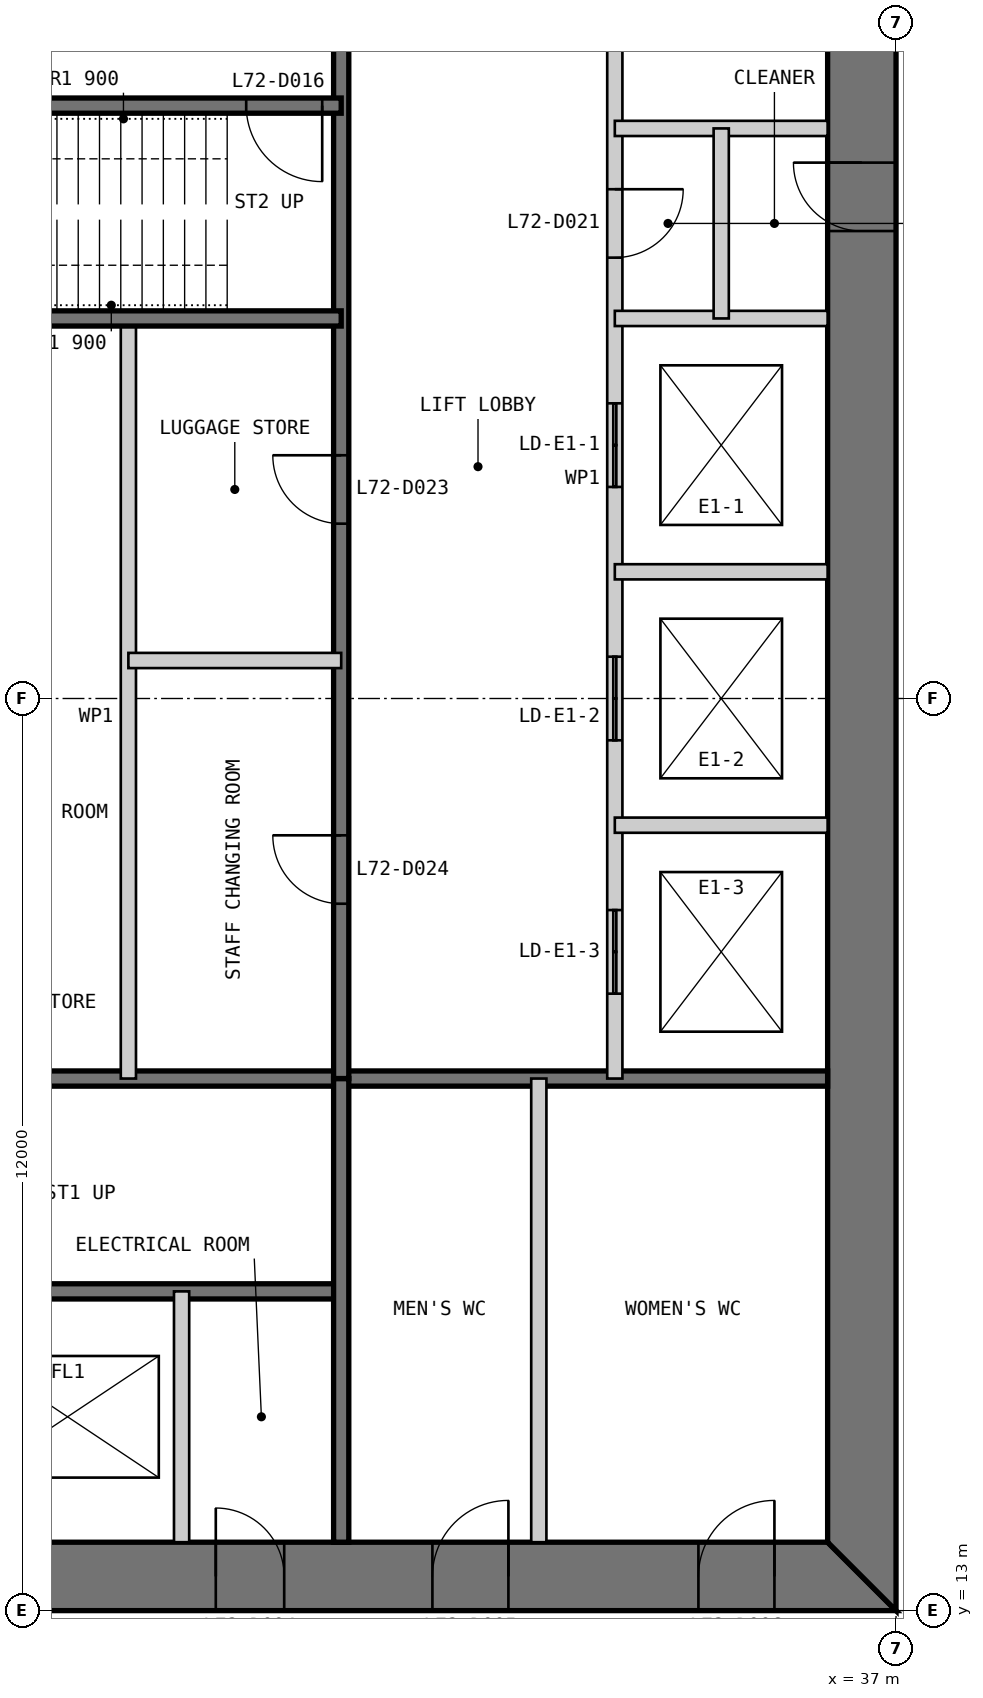
"""IFC4 building model, lengths in metres.
Left out: names, types, materials, properties, quantities, classifications, styles, units other than length and angle.
Written with IfcOpenShell. Run it as: python <this file> out.ifc"""

import sys

from ifc_helpers import new_model, si_unit, direction, frame, frame_2d, origin, place, context, subcontext, project, spatial, polyline, rectangle, outline, extrude, element, fill, save


model = new_model("IFC4")
c1 = context("Model", 3, precision=1e-05, world=origin(), true_north=direction((0.0, 1.0)))
c2 = subcontext(c1, "Body", "Model", "MODEL_VIEW")
j1 = project(units=[si_unit("LENGTHUNIT", "METRE"), si_unit("PLANEANGLEUNIT", "RADIAN")], contexts=[c1])
p1 = place(None, origin())
s1 = spatial("IfcSite", under=j1, at=p1, CompositionType="ELEMENT")
p2 = place(p1, origin())
s2 = spatial("IfcBuilding", under=s1, at=p2, CompositionType="ELEMENT")
p3 = place(p2, frame((0.0, 0.0, 296.8)))
s3 = spatial("IfcBuildingStorey", under=s2, at=p3, CompositionType="ELEMENT", Elevation=296.8)
p4 = place(p3, frame((13.0, 13.45, 0.0), z_axis=(0.0, 0.0, 1.0), x_axis=(1.0, 0.0, 0.0)))
e1 = element("IfcWall", 1, at=p4, inside=s3, PredefinedType="SHEAR", context=c2, shape_type="SweptSolid", body=[
    extrude(outline(polyline([(0.0, -0.45), (24.0, -0.45), (23.1, 0.45), (0.9, 0.45), (0.0, -0.45)])), origin(), (0.0, 0.0, 1.0), 5.0),
])
p5 = place(p4, frame((4.9, 0.0, 0.0)))
e2 = element("IfcOpeningElement", 2, at=p5, cuts=e1, PredefinedType="OPENING", context=c2, shape_type="SweptSolid", body=[
    extrude(rectangle(XDim=1.0, YDim=2.2, at=frame_2d((0.5, 1.1))), frame((0.0, 0.46, 0.0), z_axis=(0.0, -1.0, 0.0), x_axis=(1.0, 0.0, 0.0)), (0.0, 0.0, 1.0), 0.92),
])
p6 = place(p4, frame((8.9, 0.0, 0.0)))
e3 = element("IfcOpeningElement", 3, at=p6, cuts=e1, PredefinedType="OPENING", context=c2, shape_type="SweptSolid", body=[
    extrude(rectangle(XDim=1.1, YDim=2.2, at=frame_2d((0.55, 1.1))), frame((0.0, 0.46, 0.0), z_axis=(0.0, -1.0, 0.0), x_axis=(1.0, 0.0, 0.0)), (0.0, 0.0, 1.0), 0.92),
])
p7 = place(p4, frame((15.05, 0.0, 0.0)))
e4 = element("IfcOpeningElement", 4, at=p7, cuts=e1, PredefinedType="OPENING", context=c2, shape_type="SweptSolid", body=[
    extrude(rectangle(XDim=0.9, YDim=2.2, at=frame_2d((0.45, 1.1))), frame((0.0, 0.46, 0.0), z_axis=(0.0, -1.0, 0.0), x_axis=(1.0, 0.0, 0.0)), (0.0, 0.0, 1.0), 0.92),
])
p8 = place(p4, frame((17.9, 0.0, 0.0)))
e5 = element("IfcOpeningElement", 5, at=p8, cuts=e1, PredefinedType="OPENING", context=c2, shape_type="SweptSolid", body=[
    extrude(rectangle(XDim=1.0, YDim=2.2, at=frame_2d((0.5, 1.1))), frame((0.0, 0.46, 0.0), z_axis=(0.0, -1.0, 0.0), x_axis=(1.0, 0.0, 0.0)), (0.0, 0.0, 1.0), 0.92),
])
p9 = place(p4, frame((21.4, 0.0, 0.0)))
e6 = element("IfcOpeningElement", 6, at=p9, cuts=e1, PredefinedType="OPENING", context=c2, shape_type="SweptSolid", body=[
    extrude(rectangle(XDim=1.0, YDim=2.2, at=frame_2d((0.5, 1.1))), frame((0.0, 0.46, 0.0), z_axis=(0.0, -1.0, 0.0), x_axis=(1.0, 0.0, 0.0)), (0.0, 0.0, 1.0), 0.92),
])
p10 = place(p3, frame((36.55, 13.9, 0.0), z_axis=(0.0, 0.0, 1.0), x_axis=(0.0, 1.0, 0.0)))
e7 = element("IfcWall", 7, at=p10, inside=s3, PredefinedType="SHEAR", context=c2, shape_type="SweptSolid", body=[
    extrude(outline(polyline([(-0.9, -0.45), (23.1, -0.45), (22.2, 0.45), (0.0, 0.45), (-0.9, -0.45)])), origin(), (0.0, 0.0, 1.0), 5.0),
])
p11 = place(p10, frame((20.2, 0.0, 0.0)))
e8 = element("IfcOpeningElement", 8, at=p11, cuts=e7, PredefinedType="OPENING", context=c2, shape_type="SweptSolid", body=[
    extrude(rectangle(XDim=1.0, YDim=2.2, at=frame_2d((0.5, 1.1))), frame((0.0, 0.46, 0.0), z_axis=(0.0, -1.0, 0.0), x_axis=(1.0, 0.0, 0.0)), (0.0, 0.0, 1.0), 0.92),
])
p12 = place(p10, frame((17.25, 0.0, 0.0)))
e9 = element("IfcOpeningElement", 9, at=p12, cuts=e7, PredefinedType="OPENING", context=c2, shape_type="SweptSolid", body=[
    extrude(rectangle(XDim=0.9, YDim=2.2, at=frame_2d((0.45, 1.1))), frame((0.0, 0.46, 0.0), z_axis=(0.0, -1.0, 0.0), x_axis=(1.0, 0.0, 0.0)), (0.0, 0.0, 1.0), 0.92),
])
p13 = place(p3, frame((20.3, 17.2, 0.0), z_axis=(0.0, 0.0, 1.0), x_axis=(1.0, 0.0, 0.0)))
e10 = element("IfcWall", 10, at=p13, inside=s3, PredefinedType="SOLIDWALL", context=c2, shape_type="SweptSolid", body=[
    extrude(rectangle(XDim=9.4, YDim=0.2, at=frame_2d((4.7, 0.0))), origin(), (0.0, 0.0, 1.0), 4.8),
])
p14 = place(p13, frame((0.25, 0.0, 0.0)))
e11 = element("IfcOpeningElement", 11, at=p14, cuts=e10, PredefinedType="OPENING", context=c2, shape_type="SweptSolid", body=[
    extrude(rectangle(XDim=1.0, YDim=2.2, at=frame_2d((0.5, 1.1))), frame((0.0, 0.11, 0.0), z_axis=(0.0, -1.0, 0.0), x_axis=(1.0, 0.0, 0.0)), (0.0, 0.0, 1.0), 0.22),
])
p15 = place(p3, frame((20.3, 20.0, 0.0), z_axis=(0.0, 0.0, 1.0), x_axis=(1.0, 0.0, 0.0)))
e12 = element("IfcWall", 12, at=p15, inside=s3, PredefinedType="SOLIDWALL", context=c2, shape_type="SweptSolid", body=[
    extrude(rectangle(XDim=15.8, YDim=0.2, at=frame_2d((7.9, 0.0))), origin(), (0.0, 0.0, 1.0), 4.8),
])
p16 = place(p3, frame((27.6, 13.9, 0.0), z_axis=(0.0, 0.0, 1.0), x_axis=(0.0, 1.0, 0.0)))
e13 = element("IfcWall", 13, at=p16, inside=s3, PredefinedType="PARTITIONING", context=c2, shape_type="SweptSolid", body=[
    extrude(rectangle(XDim=3.3, YDim=0.2, at=frame_2d((1.65, 0.0))), origin(), (0.0, 0.0, 1.0), 4.8),
])
p17 = place(p3, frame((29.7, 13.9, 0.0), z_axis=(0.0, 0.0, 1.0), x_axis=(0.0, 1.0, 0.0)))
e14 = element("IfcWall", 14, at=p17, inside=s3, PredefinedType="SOLIDWALL", context=c2, shape_type="SweptSolid", body=[
    extrude(rectangle(XDim=6.1, YDim=0.2, at=frame_2d((3.05, 0.0))), origin(), (0.0, 0.0, 1.0), 4.8),
])
p18 = place(p3, frame((32.3, 13.9, 0.0), z_axis=(0.0, 0.0, 1.0), x_axis=(0.0, 1.0, 0.0)))
e15 = element("IfcWall", 15, at=p18, inside=s3, PredefinedType="PARTITIONING", context=c2, shape_type="SweptSolid", body=[
    extrude(rectangle(XDim=6.1, YDim=0.2, at=frame_2d((3.05, 0.0))), origin(), (0.0, 0.0, 1.0), 4.8),
])
p19 = place(p3, frame((33.3, 36.1, 0.0), z_axis=(0.0, 0.0, 1.0), x_axis=(0.0, -1.0, 0.0)))
e16 = element("IfcWall", 16, at=p19, inside=s3, PredefinedType="PARTITIONING", context=c2, shape_type="SweptSolid", body=[
    extrude(rectangle(XDim=16.1, YDim=0.2, at=frame_2d((8.05, 0.0))), origin(), (0.0, 0.0, 1.0), 4.8),
])
p20 = place(p19, frame((4.4, 0.0, 0.0)))
e17 = element("IfcOpeningElement", 17, at=p20, cuts=e16, PredefinedType="OPENING", context=c2, shape_type="SweptSolid", body=[
    extrude(rectangle(XDim=0.9, YDim=2.2, at=frame_2d((0.45, 1.1))), frame((0.0, 0.11, 0.0), z_axis=(0.0, -1.0, 0.0), x_axis=(1.0, 0.0, 0.0)), (0.0, 0.0, 1.0), 0.22),
])
p21 = place(p19, frame((7.217, 0.0, 0.0)))
e18 = element("IfcOpeningElement", 18, at=p21, cuts=e16, PredefinedType="OPENING", context=c2, shape_type="SweptSolid", body=[
    extrude(rectangle(XDim=1.1, YDim=2.2, at=frame_2d((0.55, 1.1))), frame((0.0, 0.11, 0.0), z_axis=(0.0, -1.0, 0.0), x_axis=(1.0, 0.0, 0.0)), (0.0, 0.0, 1.0), 0.22),
])
p22 = place(p19, frame((10.55, 0.0, 0.0)))
e19 = element("IfcOpeningElement", 19, at=p22, cuts=e16, PredefinedType="OPENING", context=c2, shape_type="SweptSolid", body=[
    extrude(rectangle(XDim=1.1, YDim=2.2, at=frame_2d((0.55, 1.1))), frame((0.0, 0.11, 0.0), z_axis=(0.0, -1.0, 0.0), x_axis=(1.0, 0.0, 0.0)), (0.0, 0.0, 1.0), 0.22),
])
p23 = place(p19, frame((13.883, 0.0, 0.0)))
e20 = element("IfcOpeningElement", 20, at=p23, cuts=e16, PredefinedType="OPENING", context=c2, shape_type="SweptSolid", body=[
    extrude(rectangle(XDim=1.1, YDim=2.2, at=frame_2d((0.55, 1.1))), frame((0.0, 0.11, 0.0), z_axis=(0.0, -1.0, 0.0), x_axis=(1.0, 0.0, 0.0)), (0.0, 0.0, 1.0), 0.22),
])
p24 = place(p3, frame((29.7, 36.1, 0.0), z_axis=(0.0, 0.0, 1.0), x_axis=(0.0, -1.0, 0.0)))
e21 = element("IfcWall", 21, at=p24, inside=s3, PredefinedType="SOLIDWALL", context=c2, shape_type="SweptSolid", body=[
    extrude(rectangle(XDim=16.1, YDim=0.2, at=frame_2d((8.05, 0.0))), origin(), (0.0, 0.0, 1.0), 4.8),
])
p25 = place(p24, frame((7.9, 0.0, 0.0)))
e22 = element("IfcOpeningElement", 22, at=p25, cuts=e21, PredefinedType="OPENING", context=c2, shape_type="SweptSolid", body=[
    extrude(rectangle(XDim=0.9, YDim=2.2, at=frame_2d((0.45, 1.1))), frame((0.0, 0.11, 0.0), z_axis=(0.0, -1.0, 0.0), x_axis=(1.0, 0.0, 0.0)), (0.0, 0.0, 1.0), 0.22),
])
p26 = place(p24, frame((12.9, 0.0, 0.0)))
e23 = element("IfcOpeningElement", 23, at=p26, cuts=e21, PredefinedType="OPENING", context=c2, shape_type="SweptSolid", body=[
    extrude(rectangle(XDim=0.9, YDim=2.2, at=frame_2d((0.45, 1.1))), frame((0.0, 0.11, 0.0), z_axis=(0.0, -1.0, 0.0), x_axis=(1.0, 0.0, 0.0)), (0.0, 0.0, 1.0), 0.22),
])
for number, where, z_axis, x_axis in (
    (24, (36.1, 30.0, 0.0), (0.0, 0.0, 1.0), (-1.0, 0.0, 0.0)),
    (25, (36.1, 26.667, 0.0), (0.0, 0.0, 1.0), (-1.0, 0.0, 0.0)),
    (26, (36.1, 23.333, 0.0), (0.0, 0.0, 1.0), (-1.0, 0.0, 0.0)),
):
    element("IfcWall", number, at=place(p3, frame(where, z_axis=z_axis, x_axis=x_axis)), inside=s3, PredefinedType="PARTITIONING", context=c2, shape_type="SweptSolid", body=[
        extrude(rectangle(XDim=2.8, YDim=0.2, at=frame_2d((1.4, 0.0))), origin(), (0.0, 0.0, 1.0), 4.8),
    ])
p27 = place(p3, frame((26.9, 30.0, 0.0), z_axis=(0.0, 0.0, 1.0), x_axis=(0.0, -1.0, 0.0)))
e27 = element("IfcWall", 27, at=p27, inside=s3, PredefinedType="PARTITIONING", context=c2, shape_type="SweptSolid", body=[
    extrude(rectangle(XDim=10.0, YDim=0.2, at=frame_2d((5.0, 0.0))), origin(), (0.0, 0.0, 1.0), 4.8),
])
p28 = place(p3, frame((29.7, 32.8, 0.0), z_axis=(0.0, 0.0, 1.0), x_axis=(-1.0, 0.0, 0.0)))
e28 = element("IfcWall", 28, at=p28, inside=s3, PredefinedType="SOLIDWALL", context=c2, shape_type="SweptSolid", body=[
    extrude(rectangle(XDim=9.4, YDim=0.2, at=frame_2d((4.7, 0.0))), origin(), (0.0, 0.0, 1.0), 4.8),
])
p29 = place(p28, frame((0.25, 0.0, 0.0)))
e29 = element("IfcOpeningElement", 29, at=p29, cuts=e28, PredefinedType="OPENING", context=c2, shape_type="SweptSolid", body=[
    extrude(rectangle(XDim=1.0, YDim=2.2, at=frame_2d((0.5, 1.1))), frame((0.0, 0.11, 0.0), z_axis=(0.0, -1.0, 0.0), x_axis=(1.0, 0.0, 0.0)), (0.0, 0.0, 1.0), 0.22),
])
p30 = place(p3, frame((29.7, 30.0, 0.0), z_axis=(0.0, 0.0, 1.0), x_axis=(-1.0, 0.0, 0.0)))
e30 = element("IfcWall", 30, at=p30, inside=s3, PredefinedType="SOLIDWALL", context=c2, shape_type="SweptSolid", body=[
    extrude(rectangle(XDim=15.8, YDim=0.2, at=frame_2d((7.9, 0.0))), origin(), (0.0, 0.0, 1.0), 4.8),
])
p31 = place(p3, frame((36.1, 32.5, 0.0), z_axis=(0.0, 0.0, 1.0), x_axis=(-1.0, 0.0, 0.0)))
e31 = element("IfcWall", 31, at=p31, inside=s3, PredefinedType="PARTITIONING", context=c2, shape_type="SweptSolid", body=[
    extrude(rectangle(XDim=2.8, YDim=0.2, at=frame_2d((1.4, 0.0))), origin(), (0.0, 0.0, 1.0), 4.8),
])
p32 = place(p3, frame((34.7, 32.5, 0.0), z_axis=(0.0, 0.0, 1.0), x_axis=(0.0, -1.0, 0.0)))
e32 = element("IfcWall", 32, at=p32, inside=s3, PredefinedType="PARTITIONING", context=c2, shape_type="SweptSolid", body=[
    extrude(rectangle(XDim=2.5, YDim=0.2, at=frame_2d((1.25, 0.0))), origin(), (0.0, 0.0, 1.0), 4.8),
])
p33 = place(p3, frame((29.7, 25.5, 0.0), z_axis=(0.0, 0.0, 1.0), x_axis=(-1.0, 0.0, 0.0)))
e33 = element("IfcWall", 33, at=p33, inside=s3, PredefinedType="PARTITIONING", context=c2, shape_type="SweptSolid", body=[
    extrude(rectangle(XDim=2.8, YDim=0.2, at=frame_2d((1.4, 0.0))), origin(), (0.0, 0.0, 1.0), 4.8),
])
p34 = place(p7, origin())
e34 = element("IfcDoor", 34, at=p34, inside=s3, OperationType="SINGLE_SWING_LEFT", PredefinedType="DOOR", context=c2, shape_type="SweptSolid", body=[
    extrude(rectangle(XDim=0.9, YDim=2.2, at=frame_2d((0.45, 1.1))), frame((0.0, 0.025, 0.0), z_axis=(0.0, -1.0, 0.0), x_axis=(1.0, 0.0, 0.0)), (0.0, 0.0, 1.0), 0.05),
    extrude(outline(polyline([(0.0, 0.0), (0.04, 0.0), (0.04, 2.16), (0.86, 2.16), (0.86, 0.0), (0.9, 0.0), (0.9, 2.2), (0.0, 2.2), (0.0, 0.0)])), frame((0.0, 0.3, 0.0), z_axis=(0.0, -1.0, 0.0), x_axis=(1.0, 0.0, 0.0)), (0.0, 0.0, 1.0), 0.6),
])
fill(e4, e34)
p35 = place(p8, origin())
e35 = element("IfcDoor", 35, at=p35, inside=s3, OperationType="SINGLE_SWING_RIGHT", PredefinedType="DOOR", context=c2, shape_type="SweptSolid", body=[
    extrude(rectangle(XDim=1.0, YDim=2.2, at=frame_2d((0.5, 1.1))), frame((0.0, 0.025, 0.0), z_axis=(0.0, -1.0, 0.0), x_axis=(1.0, 0.0, 0.0)), (0.0, 0.0, 1.0), 0.05),
    extrude(outline(polyline([(0.0, 0.0), (0.04, 0.0), (0.04, 2.16), (0.96, 2.16), (0.96, 0.0), (1.0, 0.0), (1.0, 2.2), (0.0, 2.2), (0.0, 0.0)])), frame((0.0, 0.3, 0.0), z_axis=(0.0, -1.0, 0.0), x_axis=(1.0, 0.0, 0.0)), (0.0, 0.0, 1.0), 0.6),
])
fill(e5, e35)
p36 = place(p9, origin())
e36 = element("IfcDoor", 36, at=p36, inside=s3, OperationType="SINGLE_SWING_RIGHT", PredefinedType="DOOR", context=c2, shape_type="SweptSolid", body=[
    extrude(rectangle(XDim=1.0, YDim=2.2, at=frame_2d((0.5, 1.1))), frame((0.0, 0.025, 0.0), z_axis=(0.0, -1.0, 0.0), x_axis=(1.0, 0.0, 0.0)), (0.0, 0.0, 1.0), 0.05),
    extrude(outline(polyline([(0.0, 0.0), (0.04, 0.0), (0.04, 2.16), (0.96, 2.16), (0.96, 0.0), (1.0, 0.0), (1.0, 2.2), (0.0, 2.2), (0.0, 0.0)])), frame((0.0, 0.3, 0.0), z_axis=(0.0, -1.0, 0.0), x_axis=(1.0, 0.0, 0.0)), (0.0, 0.0, 1.0), 0.6),
])
fill(e6, e36)
p37 = place(p29, origin())
e37 = element("IfcDoor", 37, at=p37, inside=s3, OperationType="SINGLE_SWING_LEFT", PredefinedType="DOOR", context=c2, shape_type="SweptSolid", body=[
    extrude(rectangle(XDim=1.0, YDim=2.2, at=frame_2d((0.5, 1.1))), frame((0.0, 0.025, 0.0), z_axis=(0.0, -1.0, 0.0), x_axis=(1.0, 0.0, 0.0)), (0.0, 0.0, 1.0), 0.05),
])
fill(e29, e37)
p38 = place(p20, origin())
e38 = element("IfcDoor", 38, at=p38, inside=s3, OperationType="SINGLE_SWING_LEFT", PredefinedType="DOOR", context=c2, shape_type="SweptSolid", body=[
    extrude(rectangle(XDim=0.9, YDim=2.2, at=frame_2d((0.45, 1.1))), frame((0.0, 0.025, 0.0), z_axis=(0.0, -1.0, 0.0), x_axis=(1.0, 0.0, 0.0)), (0.0, 0.0, 1.0), 0.05),
])
fill(e17, e38)
p39 = place(p12, origin())
e39 = element("IfcDoor", 39, at=p39, inside=s3, OperationType="SINGLE_SWING_RIGHT", PredefinedType="DOOR", context=c2, shape_type="SweptSolid", body=[
    extrude(rectangle(XDim=0.9, YDim=2.2, at=frame_2d((0.45, 1.1))), frame((0.0, 0.025, 0.0), z_axis=(0.0, -1.0, 0.0), x_axis=(1.0, 0.0, 0.0)), (0.0, 0.0, 1.0), 0.05),
    extrude(outline(polyline([(0.0, 0.0), (0.04, 0.0), (0.04, 2.16), (0.86, 2.16), (0.86, 0.0), (0.9, 0.0), (0.9, 2.2), (0.0, 2.2), (0.0, 0.0)])), frame((0.0, 0.3, 0.0), z_axis=(0.0, -1.0, 0.0), x_axis=(1.0, 0.0, 0.0)), (0.0, 0.0, 1.0), 0.6),
])
fill(e9, e39)
p40 = place(p25, frame((0.9, 0.0, 0.0), z_axis=(0.0, 0.0, 1.0), x_axis=(-1.0, 0.0, 0.0)))
e40 = element("IfcDoor", 40, at=p40, inside=s3, OperationType="SINGLE_SWING_RIGHT", PredefinedType="DOOR", context=c2, shape_type="SweptSolid", body=[
    extrude(rectangle(XDim=0.9, YDim=2.2, at=frame_2d((0.45, 1.1))), frame((0.0, 0.025, 0.0), z_axis=(0.0, -1.0, 0.0), x_axis=(1.0, 0.0, 0.0)), (0.0, 0.0, 1.0), 0.05),
])
fill(e22, e40)
p41 = place(p26, frame((0.9, 0.0, 0.0), z_axis=(0.0, 0.0, 1.0), x_axis=(-1.0, 0.0, 0.0)))
e41 = element("IfcDoor", 41, at=p41, inside=s3, OperationType="SINGLE_SWING_RIGHT", PredefinedType="DOOR", context=c2, shape_type="SweptSolid", body=[
    extrude(rectangle(XDim=0.9, YDim=2.2, at=frame_2d((0.45, 1.1))), frame((0.0, 0.025, 0.0), z_axis=(0.0, -1.0, 0.0), x_axis=(1.0, 0.0, 0.0)), (0.0, 0.0, 1.0), 0.05),
])
fill(e23, e41)
p42 = place(p21, origin())
e42 = element("IfcDoor", 42, at=p42, inside=s3, OperationType="DOUBLE_DOOR_SLIDING", PredefinedType="DOOR", context=c2, shape_type="SweptSolid", body=[
    extrude(rectangle(XDim=1.1, YDim=2.2, at=frame_2d((0.55, 1.1))), frame((0.0, 0.025, 0.0), z_axis=(0.0, -1.0, 0.0), x_axis=(1.0, 0.0, 0.0)), (0.0, 0.0, 1.0), 0.05),
])
fill(e18, e42)
p43 = place(p22, origin())
e43 = element("IfcDoor", 43, at=p43, inside=s3, OperationType="DOUBLE_DOOR_SLIDING", PredefinedType="DOOR", context=c2, shape_type="SweptSolid", body=[
    extrude(rectangle(XDim=1.1, YDim=2.2, at=frame_2d((0.55, 1.1))), frame((0.0, 0.025, 0.0), z_axis=(0.0, -1.0, 0.0), x_axis=(1.0, 0.0, 0.0)), (0.0, 0.0, 1.0), 0.05),
])
fill(e19, e43)
p44 = place(p23, origin())
e44 = element("IfcDoor", 44, at=p44, inside=s3, OperationType="DOUBLE_DOOR_SLIDING", PredefinedType="DOOR", context=c2, shape_type="SweptSolid", body=[
    extrude(rectangle(XDim=1.1, YDim=2.2, at=frame_2d((0.55, 1.1))), frame((0.0, 0.025, 0.0), z_axis=(0.0, -1.0, 0.0), x_axis=(1.0, 0.0, 0.0)), (0.0, 0.0, 1.0), 0.05),
])
fill(e20, e44)
save(model, sys.argv[1])
